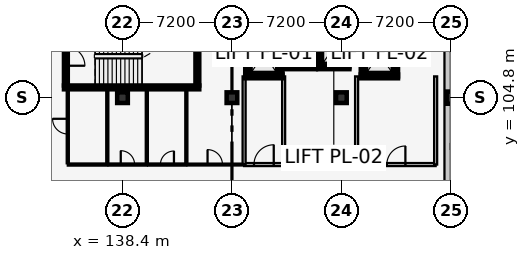
"""IFC4 building model, lengths in metres.
Left out: names, types, materials, properties, quantities, classifications, styles, units other than length and angle.
Written with IfcOpenShell. Run it as: python <this file> out.ifc"""

import sys

from ifc_helpers import new_model, si_unit, direction, frame, frame_2d, origin, origin_2d, place, context, subcontext, project, spatial, rectangle, extrude, element, fill, save


model = new_model("IFC4")
c1 = context("Model", 3, precision=1e-05, world=origin(), true_north=direction((0.0, 1.0)))
c2 = subcontext(c1, "Body", "Model", "MODEL_VIEW")
j1 = project(units=[si_unit("LENGTHUNIT", "METRE"), si_unit("PLANEANGLEUNIT", "RADIAN")], contexts=[c1])
p1 = place(None, origin())
s1 = spatial("IfcSite", under=j1, at=p1, CompositionType="ELEMENT")
p2 = place(p1, origin())
s2 = spatial("IfcBuilding", under=s1, at=p2, CompositionType="ELEMENT")
p3 = place(p2, frame((0.0, 0.0, 13.8)))
s3 = spatial("IfcBuildingStorey", under=s2, at=p3, CompositionType="ELEMENT", Elevation=13.8)
for number, where, z_axis, x_axis in (
    (1, (138.4, 104.8, 0.0), (0.0, 0.0, 1.0), (1.0, 0.0, 0.0)),
    (2, (145.6, 104.8, 0.0), (0.0, 0.0, 1.0), (1.0, 0.0, 0.0)),
    (3, (152.8, 104.8, 0.0), (0.0, 0.0, 1.0), (1.0, 0.0, 0.0)),
):
    element("IfcColumn", number, at=place(p3, frame(where, z_axis=z_axis, x_axis=x_axis)), inside=s3, PredefinedType="COLUMN", context=c2, shape_type="SweptSolid", body=[
        extrude(rectangle(XDim=0.7, YDim=0.7, at=origin_2d()), origin(), (0.0, 0.0, 1.0), 4.2),
    ])
p4 = place(p3, frame((160.0, 104.8, 0.0), z_axis=(0.0, 0.0, 1.0), x_axis=(1.0, 0.0, 0.0)))
e4 = element("IfcColumn", 4, at=p4, inside=s3, PredefinedType="COLUMN", context=c2, shape_type="SweptSolid", body=[
    extrude(rectangle(XDim=0.55, YDim=0.8, at=origin_2d()), origin(), (0.0, 0.0, 1.0), 4.2),
])
p5 = place(p3, frame((159.79, 112.0, 0.0), z_axis=(0.0, 0.0, 1.0), x_axis=(0.0, -1.0, 0.0)))
e5 = element("IfcWall", 5, at=p5, inside=s3, PredefinedType="SOLIDWALL", context=c2, shape_type="SweptSolid", body=[
    extrude(rectangle(XDim=28.8, YDim=0.42, at=frame_2d((14.4, 0.0))), origin(), (0.0, 0.0, 1.0), 3.205),
])
p6 = place(p3, frame((134.55, 105.475, 0.0), z_axis=(0.0, 0.0, 1.0), x_axis=(1.0, 0.0, 0.0)))
e6 = element("IfcWall", 6, at=p6, inside=s3, PredefinedType="SHEAR", context=c2, shape_type="SweptSolid", body=[
    extrude(rectangle(XDim=8.9, YDim=0.25, at=frame_2d((4.45, 0.0))), origin(), (0.0, 0.0, 1.0), 3.95),
])
p7 = place(p3, frame((134.675, 109.45, 0.0), z_axis=(0.0, 0.0, 1.0), x_axis=(0.0, -1.0, 0.0)))
e7 = element("IfcWall", 7, at=p7, inside=s3, PredefinedType="SHEAR", context=c2, shape_type="SweptSolid", body=[
    extrude(rectangle(XDim=3.85, YDim=0.25, at=frame_2d((1.925, 0.0))), origin(), (0.0, 0.0, 1.0), 3.95),
])
p8 = place(p7, frame((1.3, 0.0, 0.0)))
e8 = element("IfcOpeningElement", 8, at=p8, cuts=e7, PredefinedType="OPENING", context=c2, shape_type="SweptSolid", body=[
    extrude(rectangle(XDim=1.25, YDim=2.15, at=frame_2d((0.625, 1.075))), frame((0.0, 0.137, 0.0), z_axis=(0.0, -1.0, 0.0), x_axis=(1.0, 0.0, 0.0)), (0.0, 0.0, 1.0), 0.274),
])
p9 = place(p3, frame((143.325, 105.6, 0.0), z_axis=(0.0, 0.0, 1.0), x_axis=(0.0, 1.0, 0.0)))
e9 = element("IfcWall", 9, at=p9, inside=s3, PredefinedType="SHEAR", context=c2, shape_type="SweptSolid", body=[
    extrude(rectangle(XDim=3.85, YDim=0.25, at=frame_2d((1.925, 0.0))), origin(), (0.0, 0.0, 1.0), 3.95),
])
p10 = place(p3, frame((146.475, 106.2, 0.0), z_axis=(0.0, 0.0, 1.0), x_axis=(1.0, 0.0, 0.0)))
e10 = element("IfcWall", 10, at=p10, inside=s3, PredefinedType="SHEAR", context=c2, shape_type="SweptSolid", body=[
    extrude(rectangle(XDim=2.45, YDim=0.25, at=frame_2d((1.225, 0.0))), origin(), (0.0, 0.0, 1.0), 3.95),
])
p11 = place(p10, frame((0.675, 0.0, 0.0)))
e11 = element("IfcOpeningElement", 11, at=p11, cuts=e10, PredefinedType="OPENING", context=c2, shape_type="SweptSolid", body=[
    extrude(rectangle(XDim=1.1, YDim=2.15, at=frame_2d((0.55, 1.075))), frame((0.0, 0.137, 0.0), z_axis=(0.0, -1.0, 0.0), x_axis=(1.0, 0.0, 0.0)), (0.0, 0.0, 1.0), 0.274),
])
for number, where, z_axis, x_axis in (
    (12, (146.6, 109.2, 0.0), (0.0, 0.0, 1.0), (0.0, -1.0, 0.0)),
    (13, (148.8, 106.2, 0.0), (0.0, 0.0, 1.0), (0.0, 1.0, 0.0)),
):
    element("IfcWall", number, at=place(p3, frame(where, z_axis=z_axis, x_axis=x_axis)), inside=s3, PredefinedType="SHEAR", context=c2, shape_type="SweptSolid", body=[
        extrude(rectangle(XDim=3.0, YDim=0.25, at=frame_2d((1.5, 0.0))), origin(), (0.0, 0.0, 1.0), 3.95),
    ])
p12 = place(p3, frame((146.4, 100.4, 0.0), z_axis=(0.0, 0.0, 1.0), x_axis=(1.0, 0.0, 0.0)))
e14 = element("IfcWall", 14, at=p12, inside=s3, PredefinedType="PARTITIONING", context=c2, shape_type="SweptSolid", body=[
    extrude(rectangle(XDim=2.6, YDim=0.2, at=frame_2d((1.3, 0.0))), origin(), (0.0, 0.0, 1.0), 3.95),
])
p13 = place(p12, frame((0.65, 0.0, 0.0)))
e15 = element("IfcOpeningElement", 15, at=p13, cuts=e14, PredefinedType="OPENING", context=c2, shape_type="SweptSolid", body=[
    extrude(rectangle(XDim=1.3, YDim=2.2, at=frame_2d((0.65, 1.1))), frame((0.0, 0.112, 0.0), z_axis=(0.0, -1.0, 0.0), x_axis=(1.0, 0.0, 0.0)), (0.0, 0.0, 1.0), 0.224),
])
p14 = place(p3, frame((146.4, 106.2, 0.0), z_axis=(0.0, 0.0, 1.0), x_axis=(0.0, -1.0, 0.0)))
e16 = element("IfcWall", 16, at=p14, inside=s3, PredefinedType="PARTITIONING", context=c2, shape_type="SweptSolid", body=[
    extrude(rectangle(XDim=5.8, YDim=0.2, at=frame_2d((2.9, 0.0))), origin(), (0.0, 0.0, 1.0), 3.95),
])
p15 = place(p3, frame((149.0, 100.4, 0.0), z_axis=(0.0, 0.0, 1.0), x_axis=(0.0, 1.0, 0.0)))
e17 = element("IfcWall", 17, at=p15, inside=s3, PredefinedType="PARTITIONING", context=c2, shape_type="SweptSolid", body=[
    extrude(rectangle(XDim=5.8, YDim=0.2, at=frame_2d((2.9, 0.0))), origin(), (0.0, 0.0, 1.0), 3.525),
])
p16 = place(p3, frame((154.075, 106.2, 0.0), z_axis=(0.0, 0.0, 1.0), x_axis=(1.0, 0.0, 0.0)))
e18 = element("IfcWall", 18, at=p16, inside=s3, PredefinedType="SHEAR", context=c2, shape_type="SweptSolid", body=[
    extrude(rectangle(XDim=2.45, YDim=0.25, at=frame_2d((1.225, 0.0))), origin(), (0.0, 0.0, 1.0), 3.95),
])
p17 = place(p16, frame((0.675, 0.0, 0.0)))
e19 = element("IfcOpeningElement", 19, at=p17, cuts=e18, PredefinedType="OPENING", context=c2, shape_type="SweptSolid", body=[
    extrude(rectangle(XDim=1.1, YDim=2.15, at=frame_2d((0.55, 1.075))), frame((0.0, 0.137, 0.0), z_axis=(0.0, -1.0, 0.0), x_axis=(1.0, 0.0, 0.0)), (0.0, 0.0, 1.0), 0.274),
])
for number, where, z_axis, x_axis in (
    (20, (154.2, 109.2, 0.0), (0.0, 0.0, 1.0), (0.0, -1.0, 0.0)),
    (21, (156.4, 106.2, 0.0), (0.0, 0.0, 1.0), (0.0, 1.0, 0.0)),
):
    element("IfcWall", number, at=place(p3, frame(where, z_axis=z_axis, x_axis=x_axis)), inside=s3, PredefinedType="SHEAR", context=c2, shape_type="SweptSolid", body=[
        extrude(rectangle(XDim=3.0, YDim=0.25, at=frame_2d((1.5, 0.0))), origin(), (0.0, 0.0, 1.0), 3.95),
    ])
p18 = place(p3, frame((153.8, 100.4, 0.0), z_axis=(0.0, 0.0, 1.0), x_axis=(1.0, 0.0, 0.0)))
e22 = element("IfcWall", 22, at=p18, inside=s3, PredefinedType="PARTITIONING", context=c2, shape_type="SweptSolid", body=[
    extrude(rectangle(XDim=5.2, YDim=0.2, at=frame_2d((2.6, 0.0))), origin(), (0.0, 0.0, 1.0), 3.95),
])
p19 = place(p18, frame((1.99, 0.0, 0.0)))
e23 = element("IfcOpeningElement", 23, at=p19, cuts=e22, PredefinedType="OPENING", context=c2, shape_type="SweptSolid", body=[
    extrude(rectangle(XDim=1.22, YDim=2.2, at=frame_2d((0.61, 1.1))), frame((0.0, 0.112, 0.0), z_axis=(0.0, -1.0, 0.0), x_axis=(1.0, 0.0, 0.0)), (0.0, 0.0, 1.0), 0.224),
])
for number, where, z_axis, x_axis in (
    (24, (153.8, 106.2, 0.0), (0.0, 0.0, 1.0), (0.0, -1.0, 0.0)),
    (25, (159.0, 100.4, 0.0), (0.0, 0.0, 1.0), (0.0, 1.0, 0.0)),
):
    element("IfcWall", number, at=place(p3, frame(where, z_axis=z_axis, x_axis=x_axis)), inside=s3, PredefinedType="PARTITIONING", context=c2, shape_type="SweptSolid", body=[
        extrude(rectangle(XDim=5.8, YDim=0.2, at=frame_2d((2.9, 0.0))), origin(), (0.0, 0.0, 1.0), 3.95),
    ])
p20 = place(p3, frame((149.075, 106.8, 0.0), z_axis=(0.0, 0.0, 1.0), x_axis=(1.0, 0.0, 0.0)))
e26 = element("IfcWall", 26, at=p20, inside=s3, PredefinedType="SHEAR", context=c2, shape_type="SweptSolid", body=[
    extrude(rectangle(XDim=2.05, YDim=0.25, at=frame_2d((1.025, 0.0))), origin(), (0.0, 0.0, 1.0), 3.95),
])
p21 = place(p20, frame((0.525, 0.0, 0.0)))
e27 = element("IfcOpeningElement", 27, at=p21, cuts=e26, PredefinedType="OPENING", context=c2, shape_type="SweptSolid", body=[
    extrude(rectangle(XDim=1.0, YDim=2.15, at=frame_2d((0.5, 1.075))), frame((0.0, 0.137, 0.0), z_axis=(0.0, -1.0, 0.0), x_axis=(1.0, 0.0, 0.0)), (0.0, 0.0, 1.0), 0.274),
])
for number, where, z_axis, x_axis in (
    (28, (149.2, 109.4, 0.0), (0.0, 0.0, 1.0), (0.0, -1.0, 0.0)),
    (29, (151.0, 106.8, 0.0), (0.0, 0.0, 1.0), (0.0, 1.0, 0.0)),
):
    element("IfcWall", number, at=place(p3, frame(where, z_axis=z_axis, x_axis=x_axis)), inside=s3, PredefinedType="SHEAR", context=c2, shape_type="SweptSolid", body=[
        extrude(rectangle(XDim=2.6, YDim=0.25, at=frame_2d((1.3, 0.0))), origin(), (0.0, 0.0, 1.0), 3.95),
    ])
p22 = place(p3, frame((151.275, 106.8, 0.0), z_axis=(0.0, 0.0, 1.0), x_axis=(1.0, 0.0, 0.0)))
e30 = element("IfcWall", 30, at=p22, inside=s3, PredefinedType="SHEAR", context=c2, shape_type="SweptSolid", body=[
    extrude(rectangle(XDim=2.05, YDim=0.25, at=frame_2d((1.025, 0.0))), origin(), (0.0, 0.0, 1.0), 3.95),
])
p23 = place(p22, frame((0.525, 0.0, 0.0)))
e31 = element("IfcOpeningElement", 31, at=p23, cuts=e30, PredefinedType="OPENING", context=c2, shape_type="SweptSolid", body=[
    extrude(rectangle(XDim=1.0, YDim=2.15, at=frame_2d((0.5, 1.075))), frame((0.0, 0.137, 0.0), z_axis=(0.0, -1.0, 0.0), x_axis=(1.0, 0.0, 0.0)), (0.0, 0.0, 1.0), 0.274),
])
for number, where, z_axis, x_axis in (
    (32, (151.4, 109.4, 0.0), (0.0, 0.0, 1.0), (0.0, -1.0, 0.0)),
    (33, (153.2, 106.8, 0.0), (0.0, 0.0, 1.0), (0.0, 1.0, 0.0)),
):
    element("IfcWall", number, at=place(p3, frame(where, z_axis=z_axis, x_axis=x_axis)), inside=s3, PredefinedType="SHEAR", context=c2, shape_type="SweptSolid", body=[
        extrude(rectangle(XDim=2.6, YDim=0.25, at=frame_2d((1.3, 0.0))), origin(), (0.0, 0.0, 1.0), 3.95),
    ])
p24 = place(p3, frame((134.8, 100.4, 0.0), z_axis=(0.0, 0.0, 1.0), x_axis=(1.0, 0.0, 0.0)))
e34 = element("IfcWall", 34, at=p24, inside=s3, PredefinedType="PARTITIONING", context=c2, shape_type="SweptSolid", body=[
    extrude(rectangle(XDim=2.6, YDim=0.14, at=frame_2d((1.3, 0.0))), origin(), (0.0, 0.0, 1.0), 3.95),
])
p25 = place(p3, frame((134.8, 100.48, 0.0), z_axis=(0.0, 0.0, 1.0), x_axis=(0.0, 1.0, 0.0)))
e35 = element("IfcWall", 35, at=p25, inside=s3, PredefinedType="PARTITIONING", context=c2, shape_type="SweptSolid", body=[
    extrude(rectangle(XDim=4.86, YDim=0.14, at=frame_2d((2.43, 0.0))), origin(), (0.0, 0.0, 1.0), 3.685),
])
p26 = place(p25, frame((1.93, 0.0, 0.0)))
e36 = element("IfcOpeningElement", 36, at=p26, cuts=e35, PredefinedType="OPENING", context=c2, shape_type="SweptSolid", body=[
    extrude(rectangle(XDim=1.0, YDim=2.1, at=frame_2d((0.5, 1.05))), frame((0.0, 0.082, 0.0), z_axis=(0.0, -1.0, 0.0), x_axis=(1.0, 0.0, 0.0)), (0.0, 0.0, 1.0), 0.164),
])
p27 = place(p3, frame((137.4, 100.48, 0.0), z_axis=(0.0, 0.0, 1.0), x_axis=(0.0, 1.0, 0.0)))
e37 = element("IfcWall", 37, at=p27, inside=s3, PredefinedType="PARTITIONING", context=c2, shape_type="SweptSolid", body=[
    extrude(rectangle(XDim=4.86, YDim=0.14, at=frame_2d((2.43, 0.0))), origin(), (0.0, 0.0, 1.0), 3.95),
])
p28 = place(p3, frame((137.48, 100.4, 0.0), z_axis=(0.0, 0.0, 1.0), x_axis=(1.0, 0.0, 0.0)))
e38 = element("IfcWall", 38, at=p28, inside=s3, PredefinedType="PARTITIONING", context=c2, shape_type="SweptSolid", body=[
    extrude(rectangle(XDim=2.52, YDim=0.14, at=frame_2d((1.26, 0.0))), origin(), (0.0, 0.0, 1.0), 3.95),
])
p29 = place(p28, frame((0.805, 0.0, 0.0)))
e39 = element("IfcOpeningElement", 39, at=p29, cuts=e38, PredefinedType="OPENING", context=c2, shape_type="SweptSolid", body=[
    extrude(rectangle(XDim=0.91, YDim=2.06, at=frame_2d((0.455, 1.03))), frame((0.0, 0.082, 0.0), z_axis=(0.0, -1.0, 0.0), x_axis=(1.0, 0.0, 0.0)), (0.0, 0.0, 1.0), 0.164),
])
p30 = place(p3, frame((140.0, 100.48, 0.0), z_axis=(0.0, 0.0, 1.0), x_axis=(0.0, 1.0, 0.0)))
e40 = element("IfcWall", 40, at=p30, inside=s3, PredefinedType="PARTITIONING", context=c2, shape_type="SweptSolid", body=[
    extrude(rectangle(XDim=4.86, YDim=0.14, at=frame_2d((2.43, 0.0))), origin(), (0.0, 0.0, 1.0), 3.95),
])
p31 = place(p3, frame((140.08, 100.4, 0.0), z_axis=(0.0, 0.0, 1.0), x_axis=(1.0, 0.0, 0.0)))
e41 = element("IfcWall", 41, at=p31, inside=s3, PredefinedType="PARTITIONING", context=c2, shape_type="SweptSolid", body=[
    extrude(rectangle(XDim=2.52, YDim=0.14, at=frame_2d((1.26, 0.0))), origin(), (0.0, 0.0, 1.0), 3.95),
])
p32 = place(p31, frame((0.815, 0.0, 0.0)))
e42 = element("IfcOpeningElement", 42, at=p32, cuts=e41, PredefinedType="OPENING", context=c2, shape_type="SweptSolid", body=[
    extrude(rectangle(XDim=0.89, YDim=2.05, at=frame_2d((0.445, 1.025))), frame((0.0, 0.082, 0.0), z_axis=(0.0, -1.0, 0.0), x_axis=(1.0, 0.0, 0.0)), (0.0, 0.0, 1.0), 0.164),
])
p33 = place(p3, frame((142.6, 100.48, 0.0), z_axis=(0.0, 0.0, 1.0), x_axis=(0.0, 1.0, 0.0)))
e43 = element("IfcWall", 43, at=p33, inside=s3, PredefinedType="PARTITIONING", context=c2, shape_type="SweptSolid", body=[
    extrude(rectangle(XDim=4.86, YDim=0.14, at=frame_2d((2.43, 0.0))), origin(), (0.0, 0.0, 1.0), 3.95),
])
p34 = place(p3, frame((142.68, 100.4, 0.0), z_axis=(0.0, 0.0, 1.0), x_axis=(1.0, 0.0, 0.0)))
e44 = element("IfcWall", 44, at=p34, inside=s3, PredefinedType="PARTITIONING", context=c2, shape_type="SweptSolid", body=[
    extrude(rectangle(XDim=3.61, YDim=0.125, at=frame_2d((1.805, 0.0))), origin(), (0.0, 0.0, 1.0), 3.95),
])
p35 = place(p34, frame((1.315, 0.0, 0.0)))
e45 = element("IfcOpeningElement", 45, at=p35, cuts=e44, PredefinedType="OPENING", context=c2, shape_type="SweptSolid", body=[
    extrude(rectangle(XDim=0.98, YDim=2.12, at=frame_2d((0.49, 1.06))), frame((0.0, 0.074, 0.0), z_axis=(0.0, -1.0, 0.0), x_axis=(1.0, 0.0, 0.0)), (0.0, 0.0, 1.0), 0.149),
])
p36 = place(p8, origin())
e46 = element("IfcDoor", 46, at=p36, inside=s3, OperationType="SINGLE_SWING_RIGHT", PredefinedType="DOOR", context=c2, shape_type="SweptSolid", body=[
    extrude(rectangle(XDim=1.25, YDim=2.15, at=frame_2d((0.625, 1.075))), frame((0.0, 0.025, 0.0), z_axis=(0.0, -1.0, 0.0), x_axis=(1.0, 0.0, 0.0)), (0.0, 0.0, 1.0), 0.05),
])
fill(e8, e46)
p37 = place(p11, origin())
e47 = element("IfcDoor", 47, at=p37, inside=s3, OperationType="SLIDING_TO_LEFT", PredefinedType="DOOR", context=c2, shape_type="SweptSolid", body=[
    extrude(rectangle(XDim=1.1, YDim=2.15, at=frame_2d((0.55, 1.075))), frame((0.0, 0.025, 0.0), z_axis=(0.0, -1.0, 0.0), x_axis=(1.0, 0.0, 0.0)), (0.0, 0.0, 1.0), 0.05),
])
fill(e11, e47)
p38 = place(p13, origin())
e48 = element("IfcDoor", 48, at=p38, inside=s3, OperationType="SINGLE_SWING_RIGHT", PredefinedType="DOOR", context=c2, shape_type="SweptSolid", body=[
    extrude(rectangle(XDim=1.3, YDim=2.2, at=frame_2d((0.65, 1.1))), frame((0.0, 0.025, 0.0), z_axis=(0.0, -1.0, 0.0), x_axis=(1.0, 0.0, 0.0)), (0.0, 0.0, 1.0), 0.05),
])
fill(e15, e48)
p39 = place(p17, origin())
e49 = element("IfcDoor", 49, at=p39, inside=s3, OperationType="SLIDING_TO_LEFT", PredefinedType="DOOR", context=c2, shape_type="SweptSolid", body=[
    extrude(rectangle(XDim=1.1, YDim=2.15, at=frame_2d((0.55, 1.075))), frame((0.0, 0.025, 0.0), z_axis=(0.0, -1.0, 0.0), x_axis=(1.0, 0.0, 0.0)), (0.0, 0.0, 1.0), 0.05),
])
fill(e19, e49)
p40 = place(p19, origin())
e50 = element("IfcDoor", 50, at=p40, inside=s3, OperationType="SINGLE_SWING_RIGHT", PredefinedType="DOOR", context=c2, shape_type="SweptSolid", body=[
    extrude(rectangle(XDim=1.22, YDim=2.2, at=frame_2d((0.61, 1.1))), frame((0.0, 0.025, 0.0), z_axis=(0.0, -1.0, 0.0), x_axis=(1.0, 0.0, 0.0)), (0.0, 0.0, 1.0), 0.05),
])
fill(e23, e50)
p41 = place(p21, origin())
e51 = element("IfcDoor", 51, at=p41, inside=s3, OperationType="SLIDING_TO_LEFT", PredefinedType="DOOR", context=c2, shape_type="SweptSolid", body=[
    extrude(rectangle(XDim=1.0, YDim=2.15, at=frame_2d((0.5, 1.075))), frame((0.0, 0.025, 0.0), z_axis=(0.0, -1.0, 0.0), x_axis=(1.0, 0.0, 0.0)), (0.0, 0.0, 1.0), 0.05),
])
fill(e27, e51)
p42 = place(p23, origin())
e52 = element("IfcDoor", 52, at=p42, inside=s3, OperationType="SLIDING_TO_LEFT", PredefinedType="DOOR", context=c2, shape_type="SweptSolid", body=[
    extrude(rectangle(XDim=1.0, YDim=2.15, at=frame_2d((0.5, 1.075))), frame((0.0, 0.025, 0.0), z_axis=(0.0, -1.0, 0.0), x_axis=(1.0, 0.0, 0.0)), (0.0, 0.0, 1.0), 0.05),
])
fill(e31, e52)
p43 = place(p26, origin())
e53 = element("IfcDoor", 53, at=p43, inside=s3, OperationType="SINGLE_SWING_RIGHT", PredefinedType="DOOR", context=c2, shape_type="SweptSolid", body=[
    extrude(rectangle(XDim=1.0, YDim=2.1, at=frame_2d((0.5, 1.05))), frame((0.0, 0.025, 0.0), z_axis=(0.0, -1.0, 0.0), x_axis=(1.0, 0.0, 0.0)), (0.0, 0.0, 1.0), 0.05),
])
fill(e36, e53)
p44 = place(p29, origin())
e54 = element("IfcDoor", 54, at=p44, inside=s3, OperationType="SINGLE_SWING_LEFT", PredefinedType="DOOR", context=c2, shape_type="SweptSolid", body=[
    extrude(rectangle(XDim=0.91, YDim=2.06, at=frame_2d((0.455, 1.03))), frame((0.0, 0.025, 0.0), z_axis=(0.0, -1.0, 0.0), x_axis=(1.0, 0.0, 0.0)), (0.0, 0.0, 1.0), 0.05),
])
fill(e39, e54)
p45 = place(p32, origin())
e55 = element("IfcDoor", 55, at=p45, inside=s3, OperationType="SINGLE_SWING_RIGHT", PredefinedType="DOOR", context=c2, shape_type="SweptSolid", body=[
    extrude(rectangle(XDim=0.89, YDim=2.05, at=frame_2d((0.445, 1.025))), frame((0.0, 0.025, 0.0), z_axis=(0.0, -1.0, 0.0), x_axis=(1.0, 0.0, 0.0)), (0.0, 0.0, 1.0), 0.05),
])
fill(e42, e55)
p46 = place(p35, origin())
e56 = element("IfcDoor", 56, at=p46, inside=s3, OperationType="SINGLE_SWING_LEFT", PredefinedType="DOOR", context=c2, shape_type="SweptSolid", body=[
    extrude(rectangle(XDim=0.98, YDim=2.12, at=frame_2d((0.49, 1.06))), frame((0.0, 0.025, 0.0), z_axis=(0.0, -1.0, 0.0), x_axis=(1.0, 0.0, 0.0)), (0.0, 0.0, 1.0), 0.05),
])
fill(e45, e56)
save(model, sys.argv[1])
